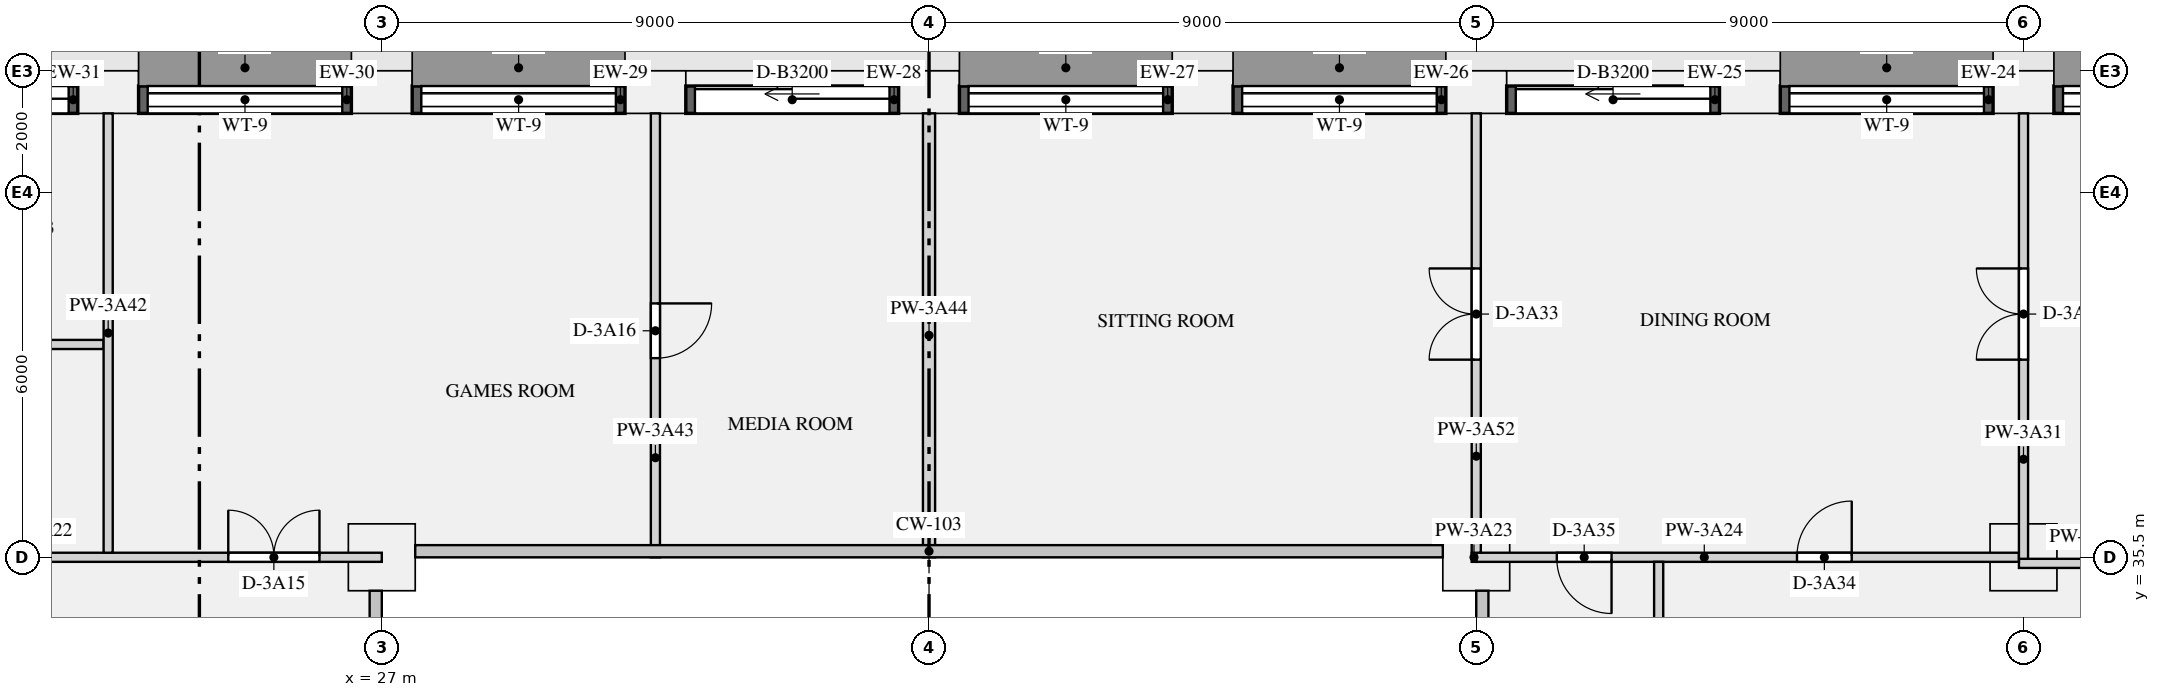
"""IFC4 building model, lengths in metres.
Left out: names, types, materials, properties, quantities, classifications, styles, units other than length and angle.
Written with IfcOpenShell. Run it as: python <this file> out.ifc"""

import sys

from ifc_helpers import new_model, si_unit, direction, frame, frame_2d, origin, origin_2d, place, context, subcontext, project, spatial, rectangle, extrude, element, fill, save


model = new_model("IFC4")
c1 = context("Model", 3, precision=1e-05, world=origin(), true_north=direction((0.0, 1.0)))
c2 = subcontext(c1, "Body", "Model", "MODEL_VIEW")
j1 = project(units=[si_unit("LENGTHUNIT", "METRE"), si_unit("PLANEANGLEUNIT", "RADIAN")], contexts=[c1])
p1 = place(None, origin())
s1 = spatial("IfcSite", under=j1, at=p1, CompositionType="ELEMENT")
p2 = place(p1, origin())
s2 = spatial("IfcBuilding", under=s1, at=p2, CompositionType="ELEMENT")
p3 = place(p2, frame((0.0, 0.0, 141.3)))
s3 = spatial("IfcBuildingStorey", under=s2, at=p3, CompositionType="ELEMENT", Elevation=141.3)
for number, where, z_axis, x_axis in (
    (1, (54.0, 43.15, 0.0), (0.0, 0.0, 1.0), (-1.0, 0.0, 0.0)),
    (2, (49.5, 43.15, 0.0), (0.0, 0.0, 1.0), (-1.0, 0.0, 0.0)),
    (3, (45.0, 43.15, 0.0), (0.0, 0.0, 1.0), (-1.0, 0.0, 0.0)),
    (4, (40.5, 43.15, 0.0), (0.0, 0.0, 1.0), (-1.0, 0.0, 0.0)),
    (5, (36.0, 43.15, 0.0), (0.0, 0.0, 1.0), (-1.0, 0.0, 0.0)),
    (6, (31.5, 43.15, 0.0), (0.0, 0.0, 1.0), (-1.0, 0.0, 0.0)),
    (7, (27.0, 43.15, 0.0), (0.0, 0.0, 1.0), (-1.0, 0.0, 0.0)),
    (8, (22.5, 43.15, 0.0), (0.0, 0.0, 1.0), (-1.0, 0.0, 0.0)),
):
    element("IfcColumn", number, at=place(p3, frame(where, z_axis=z_axis, x_axis=x_axis)), inside=s3, PredefinedType="USERDEFINED", context=c2, shape_type="SweptSolid", body=[
        extrude(rectangle(XDim=1.0, YDim=0.7, at=origin_2d()), origin(), (0.0, 0.0, 1.0), 3.15),
    ])
for number, where, z_axis, x_axis in (
    (9, (27.0, 35.5, 0.0), (0.0, 0.0, 1.0), (1.0, 0.0, 0.0)),
    (10, (45.0, 35.5, 0.0), (0.0, 0.0, 1.0), (1.0, 0.0, 0.0)),
    (11, (54.0, 35.5, 0.0), (0.0, 0.0, 1.0), (1.0, 0.0, 0.0)),
):
    element("IfcColumn", number, at=place(p3, frame(where, z_axis=z_axis, x_axis=x_axis)), inside=s3, PredefinedType="COLUMN", context=c2, shape_type="SweptSolid", body=[
        extrude(rectangle(XDim=1.1, YDim=1.1, at=origin_2d()), origin(), (0.0, 0.0, 1.0), 3.15),
    ])
p4 = place(p3, frame((58.0, 43.025, 0.9), z_axis=(0.0, 0.0, 1.0), x_axis=(-1.0, 0.0, 0.0)))
e12 = element("IfcWall", 12, at=p4, inside=s3, PredefinedType="SOLIDWALL", context=c2, shape_type="SweptSolid", body=[
    extrude(rectangle(XDim=3.5, YDim=0.45, at=frame_2d((1.75, 0.0))), origin(), (0.0, 0.0, 1.0), 1.93),
])
p5 = place(p4, frame((0.15, 0.0, 0.15)))
e13 = element("IfcOpeningElement", 13, at=p5, cuts=e12, PredefinedType="OPENING", context=c2, shape_type="SweptSolid", body=[
    extrude(rectangle(XDim=3.2, YDim=1.5, at=frame_2d((1.6, 0.75))), frame((0.0, 0.235, 0.0), z_axis=(0.0, -1.0, 0.0), x_axis=(1.0, 0.0, 0.0)), (0.0, 0.0, 1.0), 0.47),
])
p6 = place(p3, frame((53.5, 43.025, 0.9), z_axis=(0.0, 0.0, 1.0), x_axis=(-1.0, 0.0, 0.0)))
e14 = element("IfcWall", 14, at=p6, inside=s3, PredefinedType="SOLIDWALL", context=c2, shape_type="SweptSolid", body=[
    extrude(rectangle(XDim=3.5, YDim=0.45, at=frame_2d((1.75, 0.0))), origin(), (0.0, 0.0, 1.0), 1.93),
])
p7 = place(p6, frame((0.15, 0.0, 0.15)))
e15 = element("IfcOpeningElement", 15, at=p7, cuts=e14, PredefinedType="OPENING", context=c2, shape_type="SweptSolid", body=[
    extrude(rectangle(XDim=3.2, YDim=1.5, at=frame_2d((1.6, 0.75))), frame((0.0, 0.235, 0.0), z_axis=(0.0, -1.0, 0.0), x_axis=(1.0, 0.0, 0.0)), (0.0, 0.0, 1.0), 0.47),
])
p8 = place(p3, frame((49.0, 43.025, 0.0), z_axis=(0.0, 0.0, 1.0), x_axis=(-1.0, 0.0, 0.0)))
e16 = element("IfcWall", 16, at=p8, inside=s3, PredefinedType="SOLIDWALL", context=c2, shape_type="SweptSolid", body=[
    extrude(rectangle(XDim=3.5, YDim=0.45, at=frame_2d((1.75, 0.0))), origin(), (0.0, 0.0, 1.0), 2.83),
])
p9 = place(p8, frame((0.15, 0.0, 0.0)))
e17 = element("IfcOpeningElement", 17, at=p9, cuts=e16, PredefinedType="OPENING", context=c2, shape_type="SweptSolid", body=[
    extrude(rectangle(XDim=3.2, YDim=2.3, at=frame_2d((1.6, 1.15))), frame((0.0, 0.235, 0.0), z_axis=(0.0, -1.0, 0.0), x_axis=(1.0, 0.0, 0.0)), (0.0, 0.0, 1.0), 0.47),
])
p10 = place(p3, frame((44.5, 43.025, 0.9), z_axis=(0.0, 0.0, 1.0), x_axis=(-1.0, 0.0, 0.0)))
e18 = element("IfcWall", 18, at=p10, inside=s3, PredefinedType="SOLIDWALL", context=c2, shape_type="SweptSolid", body=[
    extrude(rectangle(XDim=3.5, YDim=0.45, at=frame_2d((1.75, 0.0))), origin(), (0.0, 0.0, 1.0), 1.93),
])
p11 = place(p10, frame((0.15, 0.0, 0.15)))
e19 = element("IfcOpeningElement", 19, at=p11, cuts=e18, PredefinedType="OPENING", context=c2, shape_type="SweptSolid", body=[
    extrude(rectangle(XDim=3.2, YDim=1.5, at=frame_2d((1.6, 0.75))), frame((0.0, 0.235, 0.0), z_axis=(0.0, -1.0, 0.0), x_axis=(1.0, 0.0, 0.0)), (0.0, 0.0, 1.0), 0.47),
])
p12 = place(p3, frame((40.0, 43.025, 0.9), z_axis=(0.0, 0.0, 1.0), x_axis=(-1.0, 0.0, 0.0)))
e20 = element("IfcWall", 20, at=p12, inside=s3, PredefinedType="SOLIDWALL", context=c2, shape_type="SweptSolid", body=[
    extrude(rectangle(XDim=3.5, YDim=0.45, at=frame_2d((1.75, 0.0))), origin(), (0.0, 0.0, 1.0), 1.93),
])
p13 = place(p12, frame((0.15, 0.0, 0.15)))
e21 = element("IfcOpeningElement", 21, at=p13, cuts=e20, PredefinedType="OPENING", context=c2, shape_type="SweptSolid", body=[
    extrude(rectangle(XDim=3.2, YDim=1.5, at=frame_2d((1.6, 0.75))), frame((0.0, 0.235, 0.0), z_axis=(0.0, -1.0, 0.0), x_axis=(1.0, 0.0, 0.0)), (0.0, 0.0, 1.0), 0.47),
])
p14 = place(p3, frame((35.5, 43.025, 0.0), z_axis=(0.0, 0.0, 1.0), x_axis=(-1.0, 0.0, 0.0)))
e22 = element("IfcWall", 22, at=p14, inside=s3, PredefinedType="SOLIDWALL", context=c2, shape_type="SweptSolid", body=[
    extrude(rectangle(XDim=3.5, YDim=0.45, at=frame_2d((1.75, 0.0))), origin(), (0.0, 0.0, 1.0), 2.83),
])
p15 = place(p14, frame((0.15, 0.0, 0.0)))
e23 = element("IfcOpeningElement", 23, at=p15, cuts=e22, PredefinedType="OPENING", context=c2, shape_type="SweptSolid", body=[
    extrude(rectangle(XDim=3.2, YDim=2.3, at=frame_2d((1.6, 1.15))), frame((0.0, 0.235, 0.0), z_axis=(0.0, -1.0, 0.0), x_axis=(1.0, 0.0, 0.0)), (0.0, 0.0, 1.0), 0.47),
])
p16 = place(p3, frame((31.0, 43.025, 0.9), z_axis=(0.0, 0.0, 1.0), x_axis=(-1.0, 0.0, 0.0)))
e24 = element("IfcWall", 24, at=p16, inside=s3, PredefinedType="SOLIDWALL", context=c2, shape_type="SweptSolid", body=[
    extrude(rectangle(XDim=3.5, YDim=0.45, at=frame_2d((1.75, 0.0))), origin(), (0.0, 0.0, 1.0), 1.93),
])
p17 = place(p16, frame((0.15, 0.0, 0.15)))
e25 = element("IfcOpeningElement", 25, at=p17, cuts=e24, PredefinedType="OPENING", context=c2, shape_type="SweptSolid", body=[
    extrude(rectangle(XDim=3.2, YDim=1.5, at=frame_2d((1.6, 0.75))), frame((0.0, 0.235, 0.0), z_axis=(0.0, -1.0, 0.0), x_axis=(1.0, 0.0, 0.0)), (0.0, 0.0, 1.0), 0.47),
])
p18 = place(p3, frame((26.5, 43.025, 0.9), z_axis=(0.0, 0.0, 1.0), x_axis=(-1.0, 0.0, 0.0)))
e26 = element("IfcWall", 26, at=p18, inside=s3, PredefinedType="SOLIDWALL", context=c2, shape_type="SweptSolid", body=[
    extrude(rectangle(XDim=3.5, YDim=0.45, at=frame_2d((1.75, 0.0))), origin(), (0.0, 0.0, 1.0), 1.93),
])
p19 = place(p18, frame((0.15, 0.0, 0.15)))
e27 = element("IfcOpeningElement", 27, at=p19, cuts=e26, PredefinedType="OPENING", context=c2, shape_type="SweptSolid", body=[
    extrude(rectangle(XDim=3.2, YDim=1.5, at=frame_2d((1.6, 0.75))), frame((0.0, 0.235, 0.0), z_axis=(0.0, -1.0, 0.0), x_axis=(1.0, 0.0, 0.0)), (0.0, 0.0, 1.0), 0.47),
])
p20 = place(p3, frame((22.0, 43.025, 0.0), z_axis=(0.0, 0.0, 1.0), x_axis=(-1.0, 0.0, 0.0)))
e28 = element("IfcWall", 28, at=p20, inside=s3, PredefinedType="SOLIDWALL", context=c2, shape_type="SweptSolid", body=[
    extrude(rectangle(XDim=3.5, YDim=0.45, at=frame_2d((1.75, 0.0))), origin(), (0.0, 0.0, 1.0), 2.83),
])
p21 = place(p20, frame((0.15, 0.0, 0.0)))
e29 = element("IfcOpeningElement", 29, at=p21, cuts=e28, PredefinedType="OPENING", context=c2, shape_type="SweptSolid", body=[
    extrude(rectangle(XDim=3.2, YDim=2.3, at=frame_2d((1.6, 1.15))), frame((0.0, 0.235, 0.0), z_axis=(0.0, -1.0, 0.0), x_axis=(1.0, 0.0, 0.0)), (0.0, 0.0, 1.0), 0.47),
])
p22 = place(p3, frame((53.925, 35.4, 0.0), z_axis=(0.0, 0.0, 1.0), x_axis=(1.0, 0.0, 0.0)))
e30 = element("IfcWall", 30, at=p22, inside=s3, PredefinedType="PARTITIONING", context=c2, shape_type="SweptSolid", body=[
    extrude(rectangle(XDim=2.275, YDim=0.15, at=frame_2d((1.137, 0.0))), origin(), (0.0, 0.0, 1.0), 2.83),
])
p23 = place(p3, frame((18.075, 39.0, 0.0), z_axis=(0.0, 0.0, 1.0), x_axis=(1.0, 0.0, 0.0)))
e31 = element("IfcWall", 31, at=p23, inside=s3, PredefinedType="PARTITIONING", context=c2, shape_type="SweptSolid", body=[
    extrude(rectangle(XDim=4.35, YDim=0.15, at=frame_2d((2.175, 0.0))), origin(), (0.0, 0.0, 1.0), 2.83),
])
p24 = place(p3, frame((18.075, 35.5, 0.0), z_axis=(0.0, 0.0, 1.0), x_axis=(1.0, 0.0, 0.0)))
e32 = element("IfcWall", 32, at=p24, inside=s3, PredefinedType="PARTITIONING", context=c2, shape_type="SweptSolid", body=[
    extrude(rectangle(XDim=8.925, YDim=0.15, at=frame_2d((4.462, 0.0))), origin(), (0.0, 0.0, 1.0), 2.83),
])
p25 = place(p24, frame((6.4, 0.0, 0.0)))
e33 = element("IfcOpeningElement", 33, at=p25, cuts=e32, PredefinedType="OPENING", context=c2, shape_type="SweptSolid", body=[
    extrude(rectangle(XDim=1.5, YDim=2.1, at=frame_2d((0.75, 1.05))), frame((0.0, 0.085, 0.0), z_axis=(0.0, -1.0, 0.0), x_axis=(1.0, 0.0, 0.0)), (0.0, 0.0, 1.0), 0.17),
])
p26 = place(p3, frame((44.925, 35.5, 0.0), z_axis=(0.0, 0.0, 1.0), x_axis=(1.0, 0.0, 0.0)))
e34 = element("IfcWall", 34, at=p26, inside=s3, PredefinedType="PARTITIONING", context=c2, shape_type="SweptSolid", body=[
    extrude(rectangle(XDim=0.075, YDim=0.15, at=frame_2d((0.038, 0.0))), origin(), (0.0, 0.0, 1.0), 2.83),
])
p27 = place(p3, frame((45.0, 35.5, 0.0), z_axis=(0.0, 0.0, 1.0), x_axis=(1.0, 0.0, 0.0)))
e35 = element("IfcWall", 35, at=p27, inside=s3, PredefinedType="PARTITIONING", context=c2, shape_type="SweptSolid", body=[
    extrude(rectangle(XDim=8.925, YDim=0.15, at=frame_2d((4.462, 0.0))), origin(), (0.0, 0.0, 1.0), 2.83),
])
p28 = place(p27, frame((5.275, 0.0, 0.0)))
e36 = element("IfcOpeningElement", 36, at=p28, cuts=e35, PredefinedType="OPENING", context=c2, shape_type="SweptSolid", body=[
    extrude(rectangle(XDim=0.9, YDim=2.1, at=frame_2d((0.45, 1.05))), frame((0.0, 0.085, 0.0), z_axis=(0.0, -1.0, 0.0), x_axis=(1.0, 0.0, 0.0)), (0.0, 0.0, 1.0), 0.17),
])
p29 = place(p27, frame((1.325, 0.0, 0.0)))
e37 = element("IfcOpeningElement", 37, at=p29, cuts=e35, PredefinedType="OPENING", context=c2, shape_type="SweptSolid", body=[
    extrude(rectangle(XDim=0.9, YDim=2.1, at=frame_2d((0.45, 1.05))), frame((0.0, 0.085, 0.0), z_axis=(0.0, -1.0, 0.0), x_axis=(1.0, 0.0, 0.0)), (0.0, 0.0, 1.0), 0.17),
])
p30 = place(p3, frame((54.0, 35.475, 0.0), z_axis=(0.0, 0.0, 1.0), x_axis=(0.0, 1.0, 0.0)))
e38 = element("IfcWall", 38, at=p30, inside=s3, PredefinedType="PARTITIONING", context=c2, shape_type="SweptSolid", body=[
    extrude(rectangle(XDim=7.325, YDim=0.15, at=frame_2d((3.663, 0.0))), origin(), (0.0, 0.0, 1.0), 2.83),
])
p31 = place(p30, frame((3.275, 0.0, 0.0)))
e39 = element("IfcOpeningElement", 39, at=p31, cuts=e38, PredefinedType="OPENING", context=c2, shape_type="SweptSolid", body=[
    extrude(rectangle(XDim=1.5, YDim=2.1, at=frame_2d((0.75, 1.05))), frame((0.0, 0.085, 0.0), z_axis=(0.0, -1.0, 0.0), x_axis=(1.0, 0.0, 0.0)), (0.0, 0.0, 1.0), 0.17),
])
p32 = place(p3, frame((48.0, 27.1, 0.0), z_axis=(0.0, 0.0, 1.0), x_axis=(0.0, 1.0, 0.0)))
e40 = element("IfcWall", 40, at=p32, inside=s3, PredefinedType="PARTITIONING", context=c2, shape_type="SweptSolid", body=[
    extrude(rectangle(XDim=8.325, YDim=0.15, at=frame_2d((4.163, 0.0))), origin(), (0.0, 0.0, 1.0), 2.83),
])
p33 = place(p3, frame((22.5, 35.575, 0.0), z_axis=(0.0, 0.0, 1.0), x_axis=(0.0, 1.0, 0.0)))
e41 = element("IfcWall", 41, at=p33, inside=s3, PredefinedType="PARTITIONING", context=c2, shape_type="SweptSolid", body=[
    extrude(rectangle(XDim=7.225, YDim=0.15, at=frame_2d((3.613, 0.0))), origin(), (0.0, 0.0, 1.0), 2.83),
])
p34 = place(p3, frame((31.5, 35.5, 0.0), z_axis=(0.0, 0.0, 1.0), x_axis=(0.0, 1.0, 0.0)))
e42 = element("IfcWall", 42, at=p34, inside=s3, PredefinedType="PARTITIONING", context=c2, shape_type="SweptSolid", body=[
    extrude(rectangle(XDim=7.3, YDim=0.15, at=frame_2d((3.65, 0.0))), origin(), (0.0, 0.0, 1.0), 2.83),
])
p35 = place(p34, frame((3.275, 0.0, 0.0)))
e43 = element("IfcOpeningElement", 43, at=p35, cuts=e42, PredefinedType="OPENING", context=c2, shape_type="SweptSolid", body=[
    extrude(rectangle(XDim=0.9, YDim=2.1, at=frame_2d((0.45, 1.05))), frame((0.0, 0.085, 0.0), z_axis=(0.0, -1.0, 0.0), x_axis=(1.0, 0.0, 0.0)), (0.0, 0.0, 1.0), 0.17),
])
p36 = place(p3, frame((36.0, 35.5, 0.0), z_axis=(0.0, 0.0, 1.0), x_axis=(0.0, 1.0, 0.0)))
e44 = element("IfcWall", 44, at=p36, inside=s3, PredefinedType="PARTITIONING", context=c2, shape_type="SweptSolid", body=[
    extrude(rectangle(XDim=7.3, YDim=0.2, at=frame_2d((3.65, 0.0))), origin(), (0.0, 0.0, 1.0), 2.83),
])
p37 = place(p3, frame((45.0, 35.575, 0.0), z_axis=(0.0, 0.0, 1.0), x_axis=(0.0, 1.0, 0.0)))
e45 = element("IfcWall", 45, at=p37, inside=s3, PredefinedType="PARTITIONING", context=c2, shape_type="SweptSolid", body=[
    extrude(rectangle(XDim=7.225, YDim=0.15, at=frame_2d((3.613, 0.0))), origin(), (0.0, 0.0, 1.0), 2.83),
])
p38 = place(p37, frame((3.175, 0.0, 0.0)))
e46 = element("IfcOpeningElement", 46, at=p38, cuts=e45, PredefinedType="OPENING", context=c2, shape_type="SweptSolid", body=[
    extrude(rectangle(XDim=1.5, YDim=2.1, at=frame_2d((0.75, 1.05))), frame((0.0, 0.085, 0.0), z_axis=(0.0, -1.0, 0.0), x_axis=(1.0, 0.0, 0.0)), (0.0, 0.0, 1.0), 0.17),
])
p39 = place(p5, origin())
e47 = element("IfcWindow", 47, at=p39, inside=s3, PartitioningType="SINGLE_PANEL", PredefinedType="WINDOW", context=c2, shape_type="SweptSolid", body=[
    extrude(rectangle(XDim=3.2, YDim=1.5, at=frame_2d((1.6, 0.75))), frame((0.0, -0.065, 0.0), z_axis=(0.0, -1.0, 0.0), x_axis=(1.0, 0.0, 0.0)), (0.0, 0.0, 1.0), 0.06),
])
fill(e13, e47)
p40 = place(p7, origin())
e48 = element("IfcWindow", 48, at=p40, inside=s3, PartitioningType="SINGLE_PANEL", PredefinedType="WINDOW", context=c2, shape_type="SweptSolid", body=[
    extrude(rectangle(XDim=3.2, YDim=1.5, at=frame_2d((1.6, 0.75))), frame((0.0, -0.065, 0.0), z_axis=(0.0, -1.0, 0.0), x_axis=(1.0, 0.0, 0.0)), (0.0, 0.0, 1.0), 0.06),
])
fill(e15, e48)
p41 = place(p9, origin())
e49 = element("IfcDoor", 49, at=p41, inside=s3, OperationType="SLIDING_TO_LEFT", PredefinedType="DOOR", context=c2, shape_type="SweptSolid", body=[
    extrude(rectangle(XDim=3.2, YDim=2.3, at=frame_2d((1.6, 1.15))), frame((0.0, -0.07, 0.0), z_axis=(0.0, -1.0, 0.0), x_axis=(1.0, 0.0, 0.0)), (0.0, 0.0, 1.0), 0.05),
])
fill(e17, e49)
p42 = place(p11, origin())
e50 = element("IfcWindow", 50, at=p42, inside=s3, PartitioningType="SINGLE_PANEL", PredefinedType="WINDOW", context=c2, shape_type="SweptSolid", body=[
    extrude(rectangle(XDim=3.2, YDim=1.5, at=frame_2d((1.6, 0.75))), frame((0.0, -0.065, 0.0), z_axis=(0.0, -1.0, 0.0), x_axis=(1.0, 0.0, 0.0)), (0.0, 0.0, 1.0), 0.06),
])
fill(e19, e50)
p43 = place(p13, origin())
e51 = element("IfcWindow", 51, at=p43, inside=s3, PartitioningType="SINGLE_PANEL", PredefinedType="WINDOW", context=c2, shape_type="SweptSolid", body=[
    extrude(rectangle(XDim=3.2, YDim=1.5, at=frame_2d((1.6, 0.75))), frame((0.0, -0.065, 0.0), z_axis=(0.0, -1.0, 0.0), x_axis=(1.0, 0.0, 0.0)), (0.0, 0.0, 1.0), 0.06),
])
fill(e21, e51)
p44 = place(p15, origin())
e52 = element("IfcDoor", 52, at=p44, inside=s3, OperationType="SLIDING_TO_LEFT", PredefinedType="DOOR", context=c2, shape_type="SweptSolid", body=[
    extrude(rectangle(XDim=3.2, YDim=2.3, at=frame_2d((1.6, 1.15))), frame((0.0, -0.07, 0.0), z_axis=(0.0, -1.0, 0.0), x_axis=(1.0, 0.0, 0.0)), (0.0, 0.0, 1.0), 0.05),
])
fill(e23, e52)
p45 = place(p17, origin())
e53 = element("IfcWindow", 53, at=p45, inside=s3, PartitioningType="SINGLE_PANEL", PredefinedType="WINDOW", context=c2, shape_type="SweptSolid", body=[
    extrude(rectangle(XDim=3.2, YDim=1.5, at=frame_2d((1.6, 0.75))), frame((0.0, -0.065, 0.0), z_axis=(0.0, -1.0, 0.0), x_axis=(1.0, 0.0, 0.0)), (0.0, 0.0, 1.0), 0.06),
])
fill(e25, e53)
p46 = place(p19, origin())
e54 = element("IfcWindow", 54, at=p46, inside=s3, PartitioningType="SINGLE_PANEL", PredefinedType="WINDOW", context=c2, shape_type="SweptSolid", body=[
    extrude(rectangle(XDim=3.2, YDim=1.5, at=frame_2d((1.6, 0.75))), frame((0.0, -0.065, 0.0), z_axis=(0.0, -1.0, 0.0), x_axis=(1.0, 0.0, 0.0)), (0.0, 0.0, 1.0), 0.06),
])
fill(e27, e54)
p47 = place(p21, origin())
e55 = element("IfcDoor", 55, at=p47, inside=s3, OperationType="SLIDING_TO_LEFT", PredefinedType="DOOR", context=c2, shape_type="SweptSolid", body=[
    extrude(rectangle(XDim=3.2, YDim=2.3, at=frame_2d((1.6, 1.15))), frame((0.0, -0.07, 0.0), z_axis=(0.0, -1.0, 0.0), x_axis=(1.0, 0.0, 0.0)), (0.0, 0.0, 1.0), 0.05),
])
fill(e29, e55)
p48 = place(p25, origin())
e56 = element("IfcDoor", 56, at=p48, inside=s3, OperationType="DOUBLE_DOOR_SINGLE_SWING", PredefinedType="DOOR", context=c2, shape_type="SweptSolid", body=[
    extrude(rectangle(XDim=1.5, YDim=2.1, at=frame_2d((0.75, 1.05))), frame((0.0, 0.025, 0.0), z_axis=(0.0, -1.0, 0.0), x_axis=(1.0, 0.0, 0.0)), (0.0, 0.0, 1.0), 0.05),
])
fill(e33, e56)
p49 = place(p35, frame((0.9, 0.0, 0.0), z_axis=(0.0, 0.0, 1.0), x_axis=(-1.0, 0.0, 0.0)))
e57 = element("IfcDoor", 57, at=p49, inside=s3, OperationType="SINGLE_SWING_LEFT", PredefinedType="DOOR", context=c2, shape_type="SweptSolid", body=[
    extrude(rectangle(XDim=0.9, YDim=2.1, at=frame_2d((0.45, 1.05))), frame((0.0, 0.025, 0.0), z_axis=(0.0, -1.0, 0.0), x_axis=(1.0, 0.0, 0.0)), (0.0, 0.0, 1.0), 0.05),
])
fill(e43, e57)
p50 = place(p31, origin())
e58 = element("IfcDoor", 58, at=p50, inside=s3, OperationType="DOUBLE_DOOR_SINGLE_SWING", PredefinedType="DOOR", context=c2, shape_type="SweptSolid", body=[
    extrude(rectangle(XDim=1.5, YDim=2.1, at=frame_2d((0.75, 1.05))), frame((0.0, 0.025, 0.0), z_axis=(0.0, -1.0, 0.0), x_axis=(1.0, 0.0, 0.0)), (0.0, 0.0, 1.0), 0.05),
])
fill(e39, e58)
p51 = place(p38, origin())
e59 = element("IfcDoor", 59, at=p51, inside=s3, OperationType="DOUBLE_DOOR_SINGLE_SWING", PredefinedType="DOOR", context=c2, shape_type="SweptSolid", body=[
    extrude(rectangle(XDim=1.5, YDim=2.1, at=frame_2d((0.75, 1.05))), frame((0.0, 0.025, 0.0), z_axis=(0.0, -1.0, 0.0), x_axis=(1.0, 0.0, 0.0)), (0.0, 0.0, 1.0), 0.05),
])
fill(e46, e59)
p52 = place(p28, origin())
e60 = element("IfcDoor", 60, at=p52, inside=s3, OperationType="SINGLE_SWING_RIGHT", PredefinedType="DOOR", context=c2, shape_type="SweptSolid", body=[
    extrude(rectangle(XDim=0.9, YDim=2.1, at=frame_2d((0.45, 1.05))), frame((0.0, 0.025, 0.0), z_axis=(0.0, -1.0, 0.0), x_axis=(1.0, 0.0, 0.0)), (0.0, 0.0, 1.0), 0.05),
])
fill(e36, e60)
p53 = place(p29, frame((0.9, 0.0, 0.0), z_axis=(0.0, 0.0, 1.0), x_axis=(-1.0, 0.0, 0.0)))
e61 = element("IfcDoor", 61, at=p53, inside=s3, OperationType="SINGLE_SWING_LEFT", PredefinedType="DOOR", context=c2, shape_type="SweptSolid", body=[
    extrude(rectangle(XDim=0.9, YDim=2.1, at=frame_2d((0.45, 1.05))), frame((0.0, 0.025, 0.0), z_axis=(0.0, -1.0, 0.0), x_axis=(1.0, 0.0, 0.0)), (0.0, 0.0, 1.0), 0.05),
])
fill(e37, e61)
save(model, sys.argv[1])
